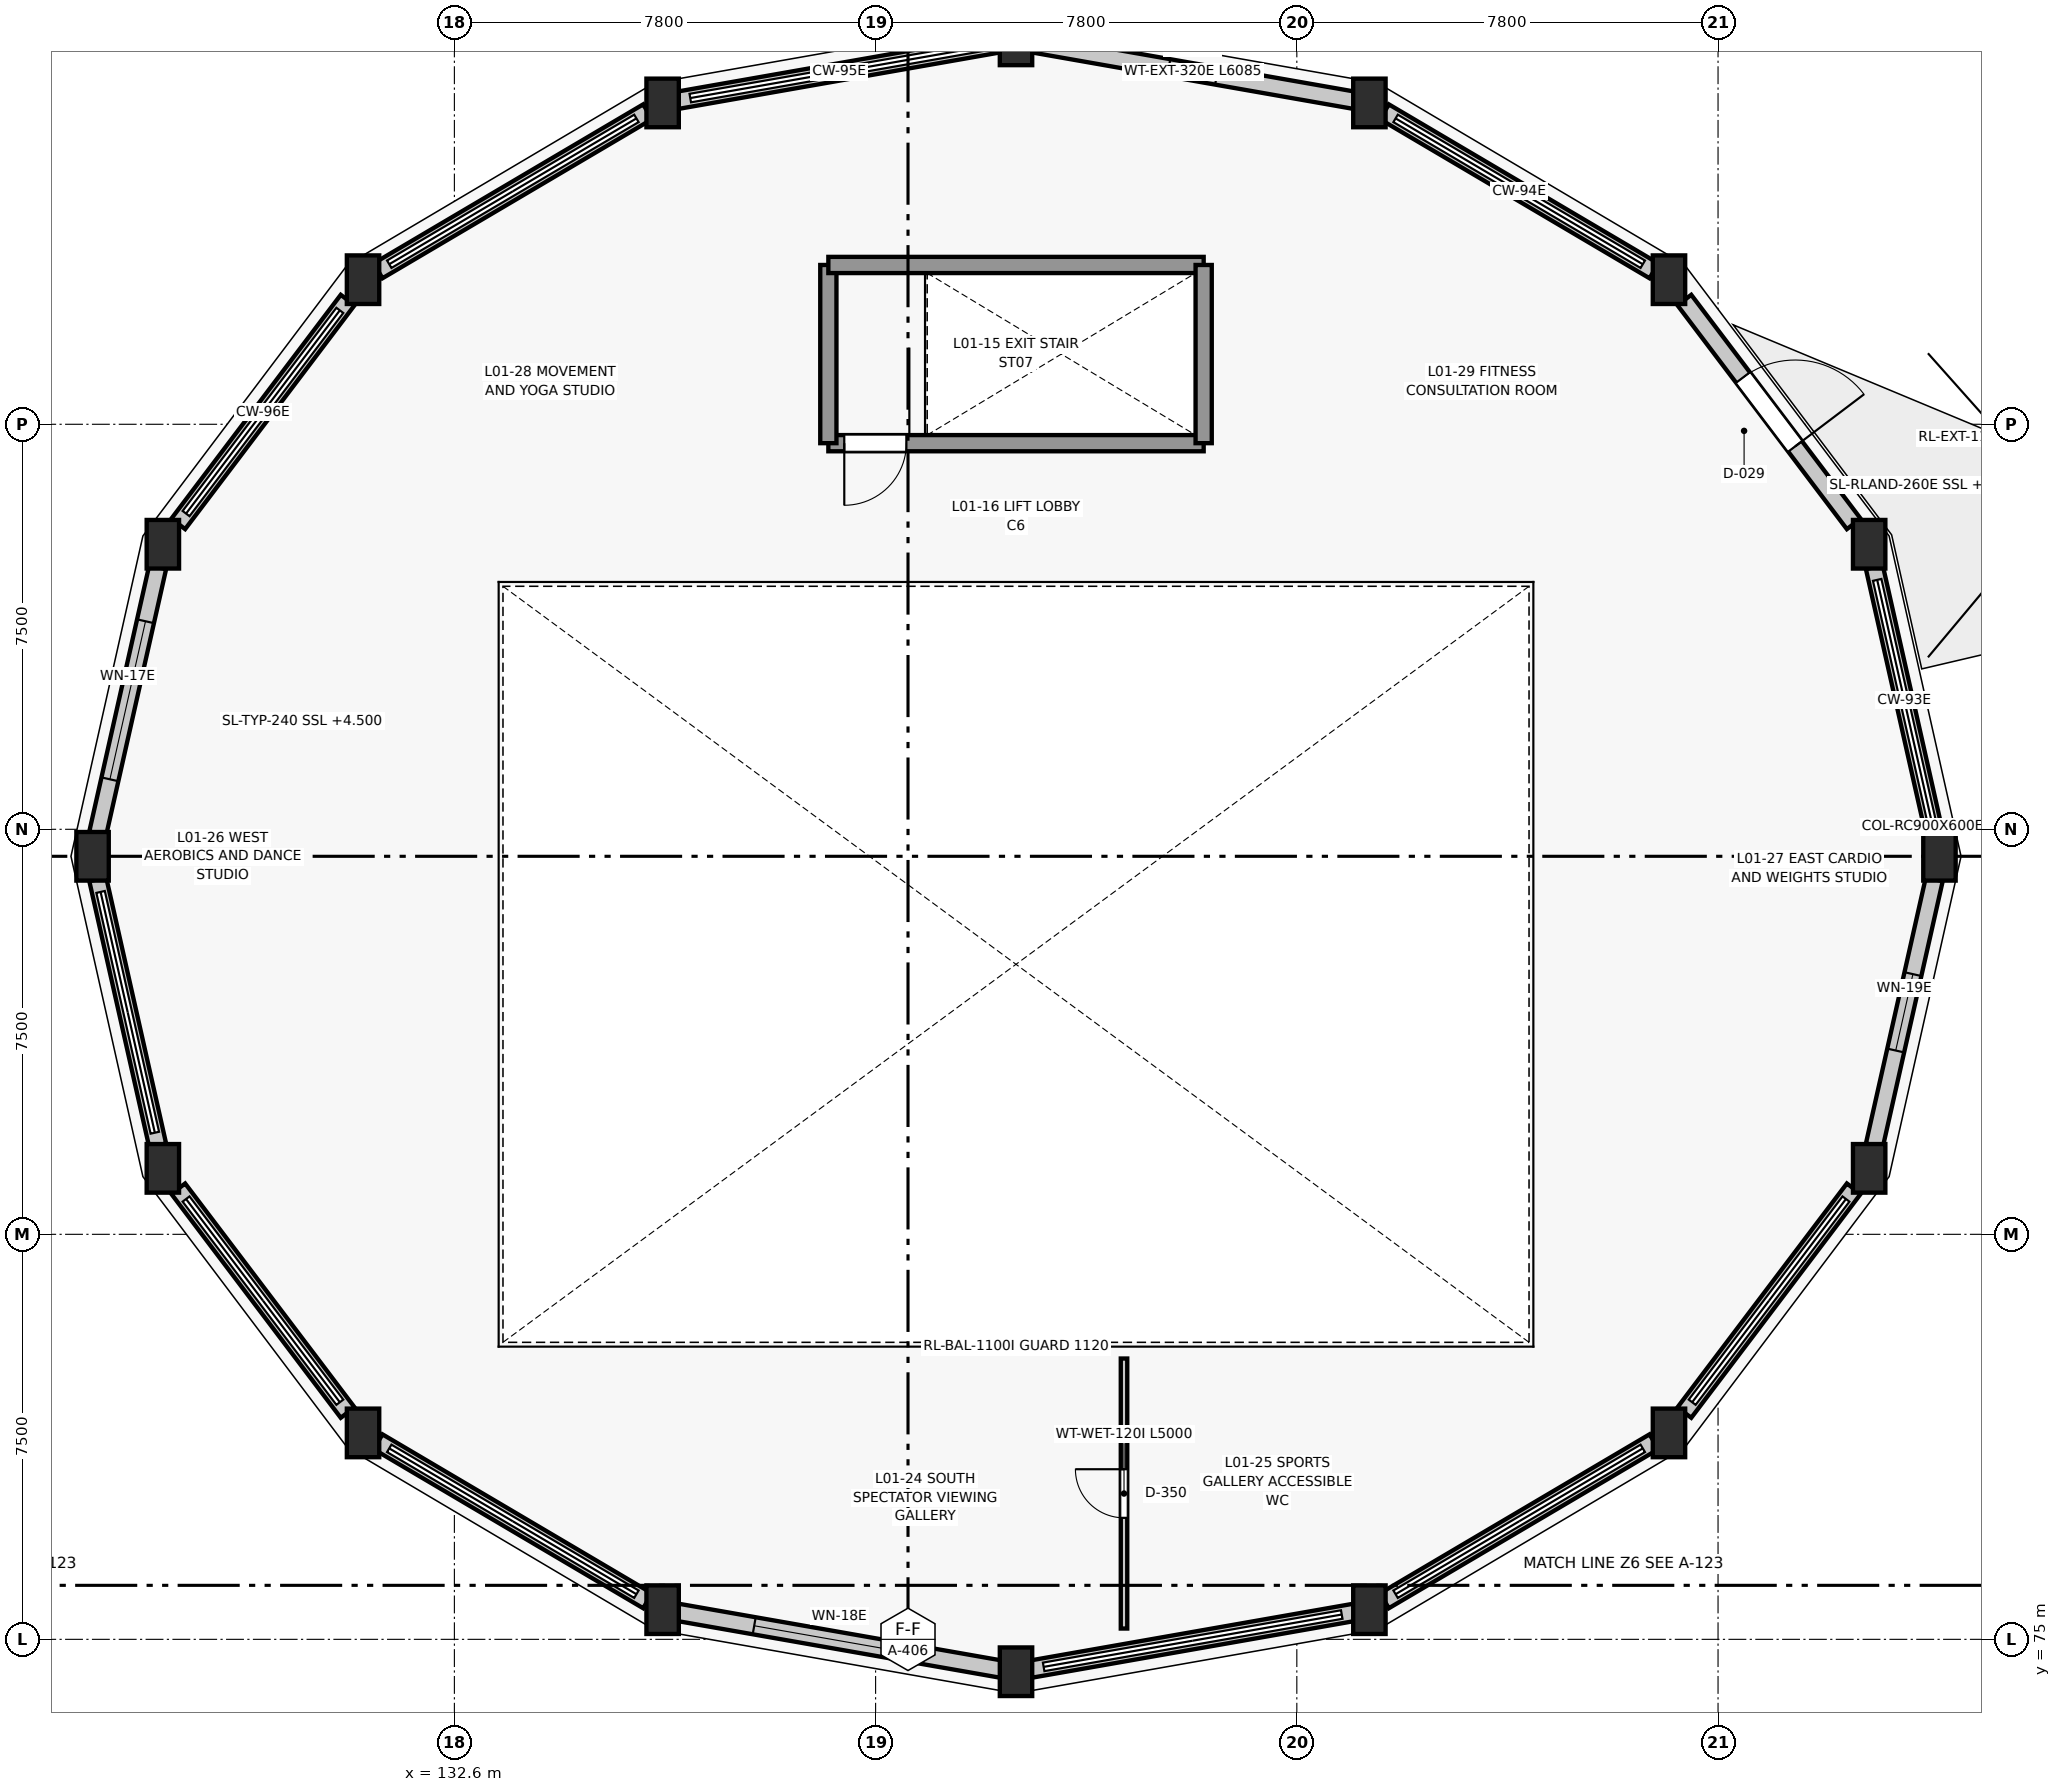
"""IFC4 building model, lengths in metres.
Left out: names, types, materials, properties, quantities, classifications, styles, units other than length and angle.
Written with IfcOpenShell. Run it as: python <this file> out.ifc"""

import sys

from ifc_helpers import new_model, si_unit, direction, frame, frame_2d, origin, origin_2d, place, context, subcontext, project, spatial, rectangle, extrude, element, fill, save


model = new_model("IFC4")
c1 = context("Model", 3, precision=1e-05, world=origin(), true_north=direction((0.0, 1.0)))
c2 = subcontext(c1, "Body", "Model", "MODEL_VIEW")
j1 = project(units=[si_unit("LENGTHUNIT", "METRE"), si_unit("PLANEANGLEUNIT", "RADIAN")], contexts=[c1])
p1 = place(None, origin())
s1 = spatial("IfcSite", under=j1, at=p1, CompositionType="ELEMENT")
p2 = place(p1, origin())
s2 = spatial("IfcBuilding", under=s1, at=p2, CompositionType="ELEMENT")
p3 = place(p2, frame((0.0, 0.0, 4.5)))
s3 = spatial("IfcBuildingStorey", under=s2, at=p3, CompositionType="ELEMENT", Elevation=4.5)
for number, where, z_axis, x_axis in (
    (1, (160.1, 89.5, 0.0), (0.0, 0.0, 1.0), (1.0, 0.0, 0.0)),
    (2, (158.798, 95.279, 0.0), (0.0, 0.0, 1.0), (1.0, 0.0, 0.0)),
    (3, (155.092, 100.177, 0.0), (0.0, 0.0, 1.0), (1.0, 0.0, 0.0)),
    (4, (149.544, 103.451, 0.0), (0.0, 0.0, 1.0), (1.0, 0.0, 0.0)),
    (5, (143.0, 104.6, 0.0), (0.0, 0.0, 1.0), (1.0, 0.0, 0.0)),
    (6, (136.456, 103.451, 0.0), (0.0, 0.0, 1.0), (1.0, 0.0, 0.0)),
    (7, (130.908, 100.177, 0.0), (0.0, 0.0, 1.0), (1.0, 0.0, 0.0)),
    (8, (127.202, 95.279, 0.0), (0.0, 0.0, 1.0), (1.0, 0.0, 0.0)),
    (9, (125.9, 89.5, 0.0), (0.0, 0.0, 1.0), (1.0, 0.0, 0.0)),
    (10, (127.202, 83.721, 0.0), (0.0, 0.0, 1.0), (1.0, 0.0, 0.0)),
    (11, (130.908, 78.823, 0.0), (0.0, 0.0, 1.0), (1.0, 0.0, 0.0)),
    (12, (136.456, 75.549, 0.0), (0.0, 0.0, 1.0), (1.0, 0.0, 0.0)),
    (13, (143.0, 74.4, 0.0), (0.0, 0.0, 1.0), (1.0, 0.0, 0.0)),
    (14, (149.544, 75.549, 0.0), (0.0, 0.0, 1.0), (1.0, 0.0, 0.0)),
    (15, (155.092, 78.823, 0.0), (0.0, 0.0, 1.0), (1.0, 0.0, 0.0)),
    (16, (158.798, 83.721, 0.0), (0.0, 0.0, 1.0), (1.0, 0.0, 0.0)),
):
    element("IfcColumn", number, at=place(p3, frame(where, z_axis=z_axis, x_axis=x_axis)), inside=s3, PredefinedType="COLUMN", context=c2, shape_type="SweptSolid", body=[
        extrude(rectangle(XDim=0.6, YDim=0.9, at=origin_2d()), origin(), (0.0, 0.0, 1.0), 4.2),
    ])
p4 = place(p3, frame((158.894, 94.853, 0.0), z_axis=(0.0, 0.0, 1.0), x_axis=(0.219744533343, -0.97555745093, 0.0)))
e17 = element("IfcWall", 17, at=p4, inside=s3, PredefinedType="STANDARD", context=c2, shape_type="SweptSolid", body=[
    extrude(rectangle(XDim=5.051, YDim=0.32, at=frame_2d((2.525, 0.0))), origin(), (0.0, 0.0, 1.0), 0.85),
])
p5 = place(p3, frame((155.376, 99.801, 0.0), z_axis=(0.0, 0.0, 1.0), x_axis=(0.603398282319, -0.797439974477, 0.0)))
e18 = element("IfcWall", 18, at=p5, inside=s3, PredefinedType="STANDARD", context=c2, shape_type="SweptSolid", body=[
    extrude(rectangle(XDim=5.199, YDim=0.32, at=frame_2d((2.599, 0.0))), origin(), (0.0, 0.0, 1.0), 3.385),
])
p6 = place(p5, frame((1.799, 0.0, 0.0)))
e19 = element("IfcOpeningElement", 19, at=p6, cuts=e18, PredefinedType="OPENING", context=c2, shape_type="SweptSolid", body=[
    extrude(rectangle(XDim=1.6, YDim=2.2, at=frame_2d((0.8, 1.1))), frame((0.0, 0.17, 0.0), z_axis=(0.0, -1.0, 0.0), x_axis=(1.0, 0.0, 0.0)), (0.0, 0.0, 1.0), 0.34),
])
p7 = place(p3, frame((149.823, 103.286, 0.0), z_axis=(0.0, 0.0, 1.0), x_axis=(0.861235880181, -0.508205429614, 0.0)))
e20 = element("IfcWall", 20, at=p7, inside=s3, PredefinedType="STANDARD", context=c2, shape_type="SweptSolid", body=[
    extrude(rectangle(XDim=5.794, YDim=0.32, at=frame_2d((2.897, 0.0))), origin(), (0.0, 0.0, 1.0), 0.85),
])
p8 = place(p3, frame((143.275, 104.552, 0.0), z_axis=(0.0, 0.0, 1.0), x_axis=(0.984927418504, -0.172968148166, 0.0)))
e21 = element("IfcWall", 21, at=p8, inside=s3, PredefinedType="STANDARD", context=c2, shape_type="SweptSolid", body=[
    extrude(rectangle(XDim=6.085, YDim=0.32, at=frame_2d((3.042, 0.0))), origin(), (0.0, 0.0, 1.0), 3.385),
])
p9 = place(p8, frame((2.592, 0.0, 0.9)))
e22 = element("IfcOpeningElement", 22, at=p9, cuts=e21, PredefinedType="OPENING", context=c2, shape_type="SweptSolid", body=[
    extrude(rectangle(XDim=0.9, YDim=0.9, at=frame_2d((0.45, 0.45))), frame((0.0, 0.17, 0.0), z_axis=(0.0, -1.0, 0.0), x_axis=(1.0, 0.0, 0.0)), (0.0, 0.0, 1.0), 0.34),
])
p10 = place(p3, frame((136.731, 103.499, 0.0), z_axis=(0.0, 0.0, 1.0), x_axis=(0.984927418504, 0.172968148166, 0.0)))
e23 = element("IfcWall", 23, at=p10, inside=s3, PredefinedType="STANDARD", context=c2, shape_type="SweptSolid", body=[
    extrude(rectangle(XDim=6.085, YDim=0.32, at=frame_2d((3.042, 0.0))), origin(), (0.0, 0.0, 1.0), 0.85),
])
p11 = place(p3, frame((131.187, 100.342, 0.0), z_axis=(0.0, 0.0, 1.0), x_axis=(0.861235880181, 0.508205429614, 0.0)))
e24 = element("IfcWall", 24, at=p11, inside=s3, PredefinedType="STANDARD", context=c2, shape_type="SweptSolid", body=[
    extrude(rectangle(XDim=5.794, YDim=0.32, at=frame_2d((2.897, 0.0))), origin(), (0.0, 0.0, 1.0), 0.85),
])
p12 = place(p3, frame((127.487, 95.655, 0.0), z_axis=(0.0, 0.0, 1.0), x_axis=(0.603398282319, 0.797439974477, 0.0)))
e25 = element("IfcWall", 25, at=p12, inside=s3, PredefinedType="STANDARD", context=c2, shape_type="SweptSolid", body=[
    extrude(rectangle(XDim=5.199, YDim=0.32, at=frame_2d((2.599, 0.0))), origin(), (0.0, 0.0, 1.0), 0.85),
])
p13 = place(p3, frame((125.996, 89.926, 0.0), z_axis=(0.0, 0.0, 1.0), x_axis=(0.219744533343, 0.97555745093, 0.0)))
e26 = element("IfcWall", 26, at=p13, inside=s3, PredefinedType="STANDARD", context=c2, shape_type="SweptSolid", body=[
    extrude(rectangle(XDim=5.051, YDim=0.32, at=frame_2d((2.525, 0.0))), origin(), (0.0, 0.0, 1.0), 3.385),
])
p14 = place(p13, frame((1.025, 0.0, 0.9)))
e27 = element("IfcOpeningElement", 27, at=p14, cuts=e26, PredefinedType="OPENING", context=c2, shape_type="SweptSolid", body=[
    extrude(rectangle(XDim=3.0, YDim=1.55, at=frame_2d((1.5, 0.775))), frame((0.0, 0.17, 0.0), z_axis=(0.0, -1.0, 0.0), x_axis=(1.0, 0.0, 0.0)), (0.0, 0.0, 1.0), 0.34),
])
p15 = place(p3, frame((127.106, 84.147, 0.0), z_axis=(0.0, 0.0, 1.0), x_axis=(-0.219744533343, 0.97555745093, 0.0)))
e28 = element("IfcWall", 28, at=p15, inside=s3, PredefinedType="STANDARD", context=c2, shape_type="SweptSolid", body=[
    extrude(rectangle(XDim=5.051, YDim=0.32, at=frame_2d((2.525, 0.0))), origin(), (0.0, 0.0, 1.0), 0.85),
])
p16 = place(p3, frame((130.624, 79.199, 0.0), z_axis=(0.0, 0.0, 1.0), x_axis=(-0.603398282319, 0.797439974477, 0.0)))
e29 = element("IfcWall", 29, at=p16, inside=s3, PredefinedType="STANDARD", context=c2, shape_type="SweptSolid", body=[
    extrude(rectangle(XDim=5.199, YDim=0.32, at=frame_2d((2.599, 0.0))), origin(), (0.0, 0.0, 1.0), 0.85),
])
p17 = place(p3, frame((136.177, 75.714, 0.0), z_axis=(0.0, 0.0, 1.0), x_axis=(-0.861235880181, 0.508205429614, 0.0)))
e30 = element("IfcWall", 30, at=p17, inside=s3, PredefinedType="STANDARD", context=c2, shape_type="SweptSolid", body=[
    extrude(rectangle(XDim=5.794, YDim=0.32, at=frame_2d((2.897, 0.0))), origin(), (0.0, 0.0, 1.0), 0.85),
])
p18 = place(p3, frame((142.725, 74.448, 0.0), z_axis=(0.0, 0.0, 1.0), x_axis=(-0.984927418504, 0.172968148166, 0.0)))
e31 = element("IfcWall", 31, at=p18, inside=s3, PredefinedType="STANDARD", context=c2, shape_type="SweptSolid", body=[
    extrude(rectangle(XDim=6.085, YDim=0.32, at=frame_2d((3.042, 0.0))), origin(), (0.0, 0.0, 1.0), 3.385),
])
p19 = place(p18, frame((1.442, 0.0, 0.9)))
e32 = element("IfcOpeningElement", 32, at=p19, cuts=e31, PredefinedType="OPENING", context=c2, shape_type="SweptSolid", body=[
    extrude(rectangle(XDim=3.2, YDim=1.55, at=frame_2d((1.6, 0.775))), frame((0.0, 0.17, 0.0), z_axis=(0.0, -1.0, 0.0), x_axis=(1.0, 0.0, 0.0)), (0.0, 0.0, 1.0), 0.34),
])
p20 = place(p3, frame((149.269, 75.501, 0.0), z_axis=(0.0, 0.0, 1.0), x_axis=(-0.984927418504, -0.172968148166, 0.0)))
e33 = element("IfcWall", 33, at=p20, inside=s3, PredefinedType="STANDARD", context=c2, shape_type="SweptSolid", body=[
    extrude(rectangle(XDim=6.085, YDim=0.32, at=frame_2d((3.042, 0.0))), origin(), (0.0, 0.0, 1.0), 0.85),
])
p21 = place(p3, frame((154.813, 78.658, 0.0), z_axis=(0.0, 0.0, 1.0), x_axis=(-0.861235880181, -0.508205429614, 0.0)))
e34 = element("IfcWall", 34, at=p21, inside=s3, PredefinedType="STANDARD", context=c2, shape_type="SweptSolid", body=[
    extrude(rectangle(XDim=5.794, YDim=0.32, at=frame_2d((2.897, 0.0))), origin(), (0.0, 0.0, 1.0), 0.85),
])
p22 = place(p3, frame((158.513, 83.345, 0.0), z_axis=(0.0, 0.0, 1.0), x_axis=(-0.603398282319, -0.797439974477, 0.0)))
e35 = element("IfcWall", 35, at=p22, inside=s3, PredefinedType="STANDARD", context=c2, shape_type="SweptSolid", body=[
    extrude(rectangle(XDim=5.199, YDim=0.32, at=frame_2d((2.599, 0.0))), origin(), (0.0, 0.0, 1.0), 0.85),
])
p23 = place(p3, frame((160.004, 89.074, 0.0), z_axis=(0.0, 0.0, 1.0), x_axis=(-0.219744533343, -0.97555745093, 0.0)))
e36 = element("IfcWall", 36, at=p23, inside=s3, PredefinedType="STANDARD", context=c2, shape_type="SweptSolid", body=[
    extrude(rectangle(XDim=5.051, YDim=0.32, at=frame_2d((2.525, 0.0))), origin(), (0.0, 0.0, 1.0), 3.385),
])
p24 = place(p23, frame((1.8, 0.0, 0.9)))
e37 = element("IfcOpeningElement", 37, at=p24, cuts=e36, PredefinedType="OPENING", context=c2, shape_type="SweptSolid", body=[
    extrude(rectangle(XDim=1.45, YDim=1.75, at=frame_2d((0.725, 0.875))), frame((0.0, 0.17, 0.0), z_axis=(0.0, -1.0, 0.0), x_axis=(1.0, 0.0, 0.0)), (0.0, 0.0, 1.0), 0.34),
])
p25 = place(p3, frame((146.475, 97.15, 0.0), z_axis=(0.0, 0.0, 1.0), x_axis=(-1.0, 0.0, 0.0)))
e38 = element("IfcWall", 38, at=p25, inside=s3, PredefinedType="SHEAR", context=c2, shape_type="SweptSolid", body=[
    extrude(rectangle(XDim=6.95, YDim=0.3, at=frame_2d((3.475, 0.0))), origin(), (0.0, 0.0, 1.0), 4.2),
])
p26 = place(p25, frame((5.505, 0.0, 0.0)))
e39 = element("IfcOpeningElement", 39, at=p26, cuts=e38, PredefinedType="OPENING", context=c2, shape_type="SweptSolid", body=[
    extrude(rectangle(XDim=1.15, YDim=2.15, at=frame_2d((0.575, 1.075))), frame((0.0, 0.16, 0.0), z_axis=(0.0, -1.0, 0.0), x_axis=(1.0, 0.0, 0.0)), (0.0, 0.0, 1.0), 0.32),
])
p27 = place(p3, frame((139.525, 97.15, 0.0), z_axis=(0.0, 0.0, 1.0), x_axis=(0.0, 1.0, 0.0)))
e40 = element("IfcWall", 40, at=p27, inside=s3, PredefinedType="SHEAR", context=c2, shape_type="SweptSolid", body=[
    extrude(rectangle(XDim=3.3, YDim=0.3, at=frame_2d((1.65, 0.0))), origin(), (0.0, 0.0, 1.0), 4.2),
])
p28 = place(p3, frame((139.525, 100.45, 0.0), z_axis=(0.0, 0.0, 1.0), x_axis=(1.0, 0.0, 0.0)))
e41 = element("IfcWall", 41, at=p28, inside=s3, PredefinedType="SHEAR", context=c2, shape_type="SweptSolid", body=[
    extrude(rectangle(XDim=6.95, YDim=0.3, at=frame_2d((3.475, 0.0))), origin(), (0.0, 0.0, 1.0), 4.2),
])
p29 = place(p3, frame((146.475, 100.45, 0.0), z_axis=(0.0, 0.0, 1.0), x_axis=(0.0, -1.0, 0.0)))
e42 = element("IfcWall", 42, at=p29, inside=s3, PredefinedType="SHEAR", context=c2, shape_type="SweptSolid", body=[
    extrude(rectangle(XDim=3.3, YDim=0.3, at=frame_2d((1.65, 0.0))), origin(), (0.0, 0.0, 1.0), 4.2),
])
p30 = place(p3, frame((145.0, 75.2, 0.0), z_axis=(0.0, 0.0, 1.0), x_axis=(0.0, 1.0, 0.0)))
e43 = element("IfcWall", 43, at=p30, inside=s3, PredefinedType="PARTITIONING", context=c2, shape_type="SweptSolid", body=[
    extrude(rectangle(XDim=5.0, YDim=0.12, at=frame_2d((2.5, 0.0))), origin(), (0.0, 0.0, 1.0), 11.745),
])
p31 = place(p30, frame((2.05, 0.0, 0.0)))
e44 = element("IfcOpeningElement", 44, at=p31, cuts=e43, PredefinedType="OPENING", context=c2, shape_type="SweptSolid", body=[
    extrude(rectangle(XDim=0.9, YDim=2.1, at=frame_2d((0.45, 1.05))), frame((0.0, 0.07, 0.0), z_axis=(0.0, -1.0, 0.0), x_axis=(1.0, 0.0, 0.0)), (0.0, 0.0, 1.0), 0.14),
])
p32 = place(p6, origin())
e45 = element("IfcDoor", 45, at=p32, inside=s3, OperationType="SINGLE_SWING_RIGHT", PredefinedType="DOOR", context=c2, shape_type="SweptSolid", body=[
    extrude(rectangle(XDim=1.6, YDim=2.2, at=frame_2d((0.8, 1.1))), frame((0.0, 0.025, 0.0), z_axis=(0.0, -1.0, 0.0), x_axis=(1.0, 0.0, 0.0)), (0.0, 0.0, 1.0), 0.05),
])
fill(e19, e45)
p33 = place(p9, origin())
e46 = element("IfcWindow", 46, at=p33, inside=s3, PartitioningType="SINGLE_PANEL", PredefinedType="WINDOW", context=c2, shape_type="SweptSolid", body=[
    extrude(rectangle(XDim=0.9, YDim=0.9, at=frame_2d((0.45, 0.45))), frame((0.0, 0.03, 0.0), z_axis=(0.0, -1.0, 0.0), x_axis=(1.0, 0.0, 0.0)), (0.0, 0.0, 1.0), 0.06),
])
fill(e22, e46)
p34 = place(p14, origin())
e47 = element("IfcWindow", 47, at=p34, inside=s3, PartitioningType="SINGLE_PANEL", PredefinedType="WINDOW", context=c2, shape_type="SweptSolid", body=[
    extrude(rectangle(XDim=3.0, YDim=1.55, at=frame_2d((1.5, 0.775))), frame((0.0, 0.03, 0.0), z_axis=(0.0, -1.0, 0.0), x_axis=(1.0, 0.0, 0.0)), (0.0, 0.0, 1.0), 0.06),
])
fill(e27, e47)
p35 = place(p19, origin())
e48 = element("IfcWindow", 48, at=p35, inside=s3, PartitioningType="SINGLE_PANEL", PredefinedType="WINDOW", context=c2, shape_type="SweptSolid", body=[
    extrude(rectangle(XDim=3.2, YDim=1.55, at=frame_2d((1.6, 0.775))), frame((0.0, 0.03, 0.0), z_axis=(0.0, -1.0, 0.0), x_axis=(1.0, 0.0, 0.0)), (0.0, 0.0, 1.0), 0.06),
])
fill(e32, e48)
p36 = place(p24, origin())
e49 = element("IfcWindow", 49, at=p36, inside=s3, PartitioningType="SINGLE_PANEL", PredefinedType="WINDOW", context=c2, shape_type="SweptSolid", body=[
    extrude(rectangle(XDim=1.45, YDim=1.75, at=frame_2d((0.725, 0.875))), frame((0.0, 0.03, 0.0), z_axis=(0.0, -1.0, 0.0), x_axis=(1.0, 0.0, 0.0)), (0.0, 0.0, 1.0), 0.06),
])
fill(e37, e49)
p37 = place(p26, origin())
e50 = element("IfcDoor", 50, at=p37, inside=s3, OperationType="SINGLE_SWING_RIGHT", PredefinedType="DOOR", context=c2, shape_type="SweptSolid", body=[
    extrude(rectangle(XDim=1.15, YDim=2.15, at=frame_2d((0.575, 1.075))), frame((0.0, 0.025, 0.0), z_axis=(0.0, -1.0, 0.0), x_axis=(1.0, 0.0, 0.0)), (0.0, 0.0, 1.0), 0.05),
])
fill(e39, e50)
p38 = place(p31, origin())
e51 = element("IfcDoor", 51, at=p38, inside=s3, OperationType="SINGLE_SWING_RIGHT", PredefinedType="DOOR", context=c2, shape_type="SweptSolid", body=[
    extrude(rectangle(XDim=0.9, YDim=2.1, at=frame_2d((0.45, 1.05))), frame((0.0, 0.025, 0.0), z_axis=(0.0, -1.0, 0.0), x_axis=(1.0, 0.0, 0.0)), (0.0, 0.0, 1.0), 0.05),
])
fill(e44, e51)
save(model, sys.argv[1])
